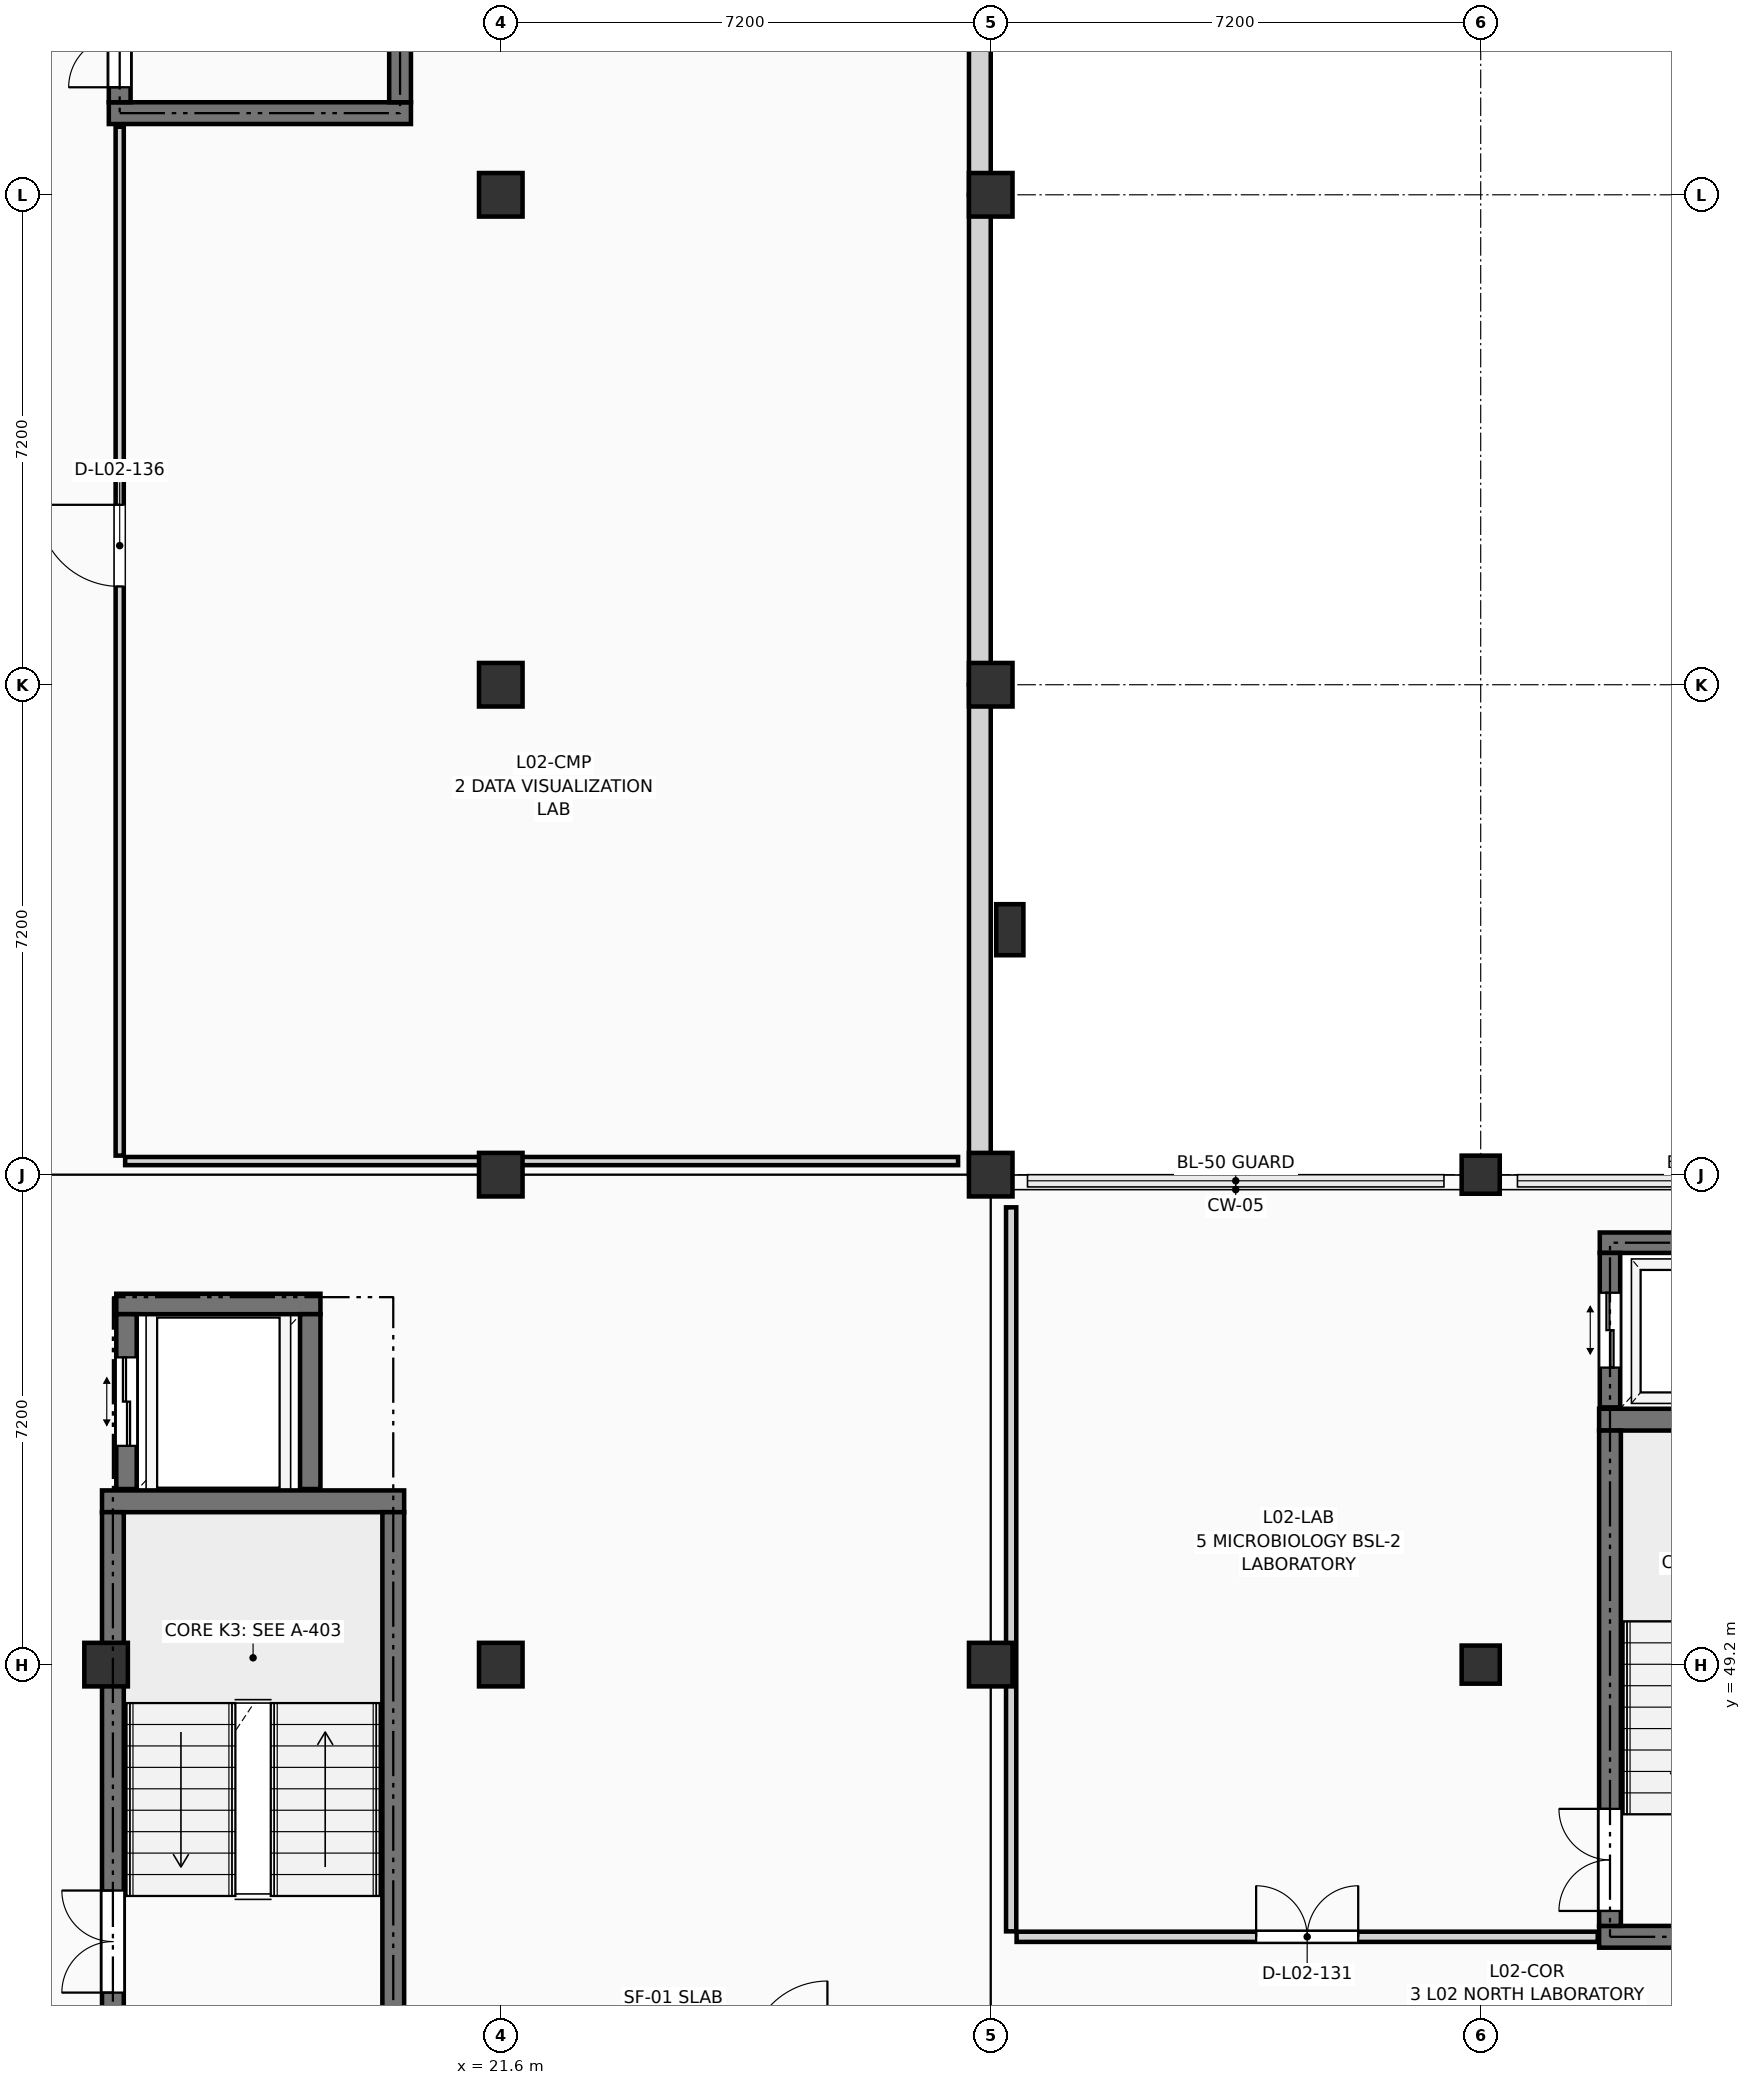
"""IFC4 building model, lengths in metres.
Left out: names, types, materials, properties, quantities, classifications, styles, units other than length and angle.
Written with IfcOpenShell. Run it as: python <this file> out.ifc"""

import sys

from ifc_helpers import new_model, si_unit, direction, frame, frame_2d, origin, origin_2d, place, context, subcontext, project, spatial, rectangle, extrude, element, fill, save


model = new_model("IFC4")
c1 = context("Model", 3, precision=1e-05, world=origin(), true_north=direction((0.0, 1.0)))
c2 = subcontext(c1, "Body", "Model", "MODEL_VIEW")
j1 = project(units=[si_unit("LENGTHUNIT", "METRE"), si_unit("PLANEANGLEUNIT", "RADIAN")], contexts=[c1])
p1 = place(None, origin())
s1 = spatial("IfcSite", under=j1, at=p1, CompositionType="ELEMENT")
p2 = place(p1, origin())
s2 = spatial("IfcBuilding", under=s1, at=p2, CompositionType="ELEMENT")
p3 = place(p2, frame((0.0, 0.0, 8.55)))
s3 = spatial("IfcBuildingStorey", under=s2, at=p3, CompositionType="ELEMENT", Elevation=8.55)
for number, where, z_axis, x_axis in (
    (1, (15.8, 49.2, 0.0), (0.0, 0.0, 1.0), (1.0, 0.0, 0.0)),
    (2, (21.6, 49.2, 0.0), (0.0, 0.0, 1.0), (1.0, 0.0, 0.0)),
    (3, (21.6, 56.4, 0.0), (0.0, 0.0, 1.0), (1.0, 0.0, 0.0)),
    (4, (21.6, 63.6, 0.0), (0.0, 0.0, 1.0), (1.0, 0.0, 0.0)),
    (5, (21.6, 70.8, 0.0), (0.0, 0.0, 1.0), (1.0, 0.0, 0.0)),
    (6, (28.8, 49.2, 0.0), (0.0, 0.0, 1.0), (1.0, 0.0, 0.0)),
    (7, (28.8, 56.4, 0.0), (0.0, 0.0, 1.0), (1.0, 0.0, 0.0)),
    (8, (28.8, 63.6, 0.0), (0.0, 0.0, 1.0), (1.0, 0.0, 0.0)),
    (9, (28.8, 70.8, 0.0), (0.0, 0.0, 1.0), (1.0, 0.0, 0.0)),
):
    element("IfcColumn", number, at=place(p3, frame(where, z_axis=z_axis, x_axis=x_axis)), inside=s3, PredefinedType="COLUMN", context=c2, shape_type="SweptSolid", body=[
        extrude(rectangle(XDim=0.64, YDim=0.64, at=origin_2d()), origin(), (0.0, 0.0, 1.0), 3.6),
    ])
for number, where, z_axis, x_axis in (
    (10, (36.0, 49.2, 0.0), (0.0, 0.0, 1.0), (1.0, 0.0, 0.0)),
    (11, (36.0, 56.4, 0.0), (0.0, 0.0, 1.0), (1.0, 0.0, 0.0)),
):
    element("IfcColumn", number, at=place(p3, frame(where, z_axis=z_axis, x_axis=x_axis)), inside=s3, PredefinedType="COLUMN", context=c2, shape_type="SweptSolid", body=[
        extrude(rectangle(XDim=0.56, YDim=0.56, at=origin_2d()), origin(), (0.0, 0.0, 1.0), 3.6),
    ])
p4 = place(p3, frame((29.08, 60.0, 0.0), z_axis=(0.0, 0.0, 1.0), x_axis=(1.0, 0.0, 0.0)))
e12 = element("IfcColumn", 12, at=p4, inside=s3, PredefinedType="PILASTER", context=c2, shape_type="SweptSolid", body=[
    extrude(rectangle(XDim=0.4, YDim=0.75, at=origin_2d()), origin(), (0.0, 0.0, 1.0), 3.6),
])
for number, where, z_axis, x_axis in (
    (13, (28.64, 70.8, 0.0), (0.0, 0.0, 1.0), (0.0, 1.0, 0.0)),
    (14, (28.64, 63.6, 0.0), (0.0, 0.0, 1.0), (0.0, 1.0, 0.0)),
):
    element("IfcWall", number, at=place(p3, frame(where, z_axis=z_axis, x_axis=x_axis)), inside=s3, PredefinedType="SOLIDWALL", context=c2, shape_type="SweptSolid", body=[
        extrude(rectangle(XDim=7.2, YDim=0.32, at=frame_2d((3.6, 0.0))), origin(), (0.0, 0.0, 1.0), 2.84),
    ])
p5 = place(p3, frame((28.64, 56.4, 0.0), z_axis=(0.0, 0.0, 1.0), x_axis=(0.0, 1.0, 0.0)))
e15 = element("IfcWall", 15, at=p5, inside=s3, PredefinedType="SOLIDWALL", context=c2, shape_type="SweptSolid", body=[
    extrude(rectangle(XDim=7.2, YDim=0.32, at=frame_2d((3.6, 0.0))), origin(), (0.0, 0.0, 1.0), 2.84),
])
p6 = place(p3, frame((15.74, 51.6, 0.0), z_axis=(0.0, 0.0, 1.0), x_axis=(1.0, 0.0, 0.0)))
e16 = element("IfcWall", 16, at=p6, inside=s3, PredefinedType="SHEAR", context=c2, shape_type="SweptSolid", body=[
    extrude(rectangle(XDim=4.44, YDim=0.32, at=frame_2d((2.22, 0.0))), origin(), (0.0, 0.0, 1.0), 3.39),
])
p7 = place(p3, frame((15.9, 44.16, 0.0), z_axis=(0.0, 0.0, 1.0), x_axis=(0.0, 1.0, 0.0)))
e17 = element("IfcWall", 17, at=p7, inside=s3, PredefinedType="SHEAR", context=c2, shape_type="SweptSolid", body=[
    extrude(rectangle(XDim=7.28, YDim=0.32, at=frame_2d((3.64, 0.0))), origin(), (0.0, 0.0, 1.0), 3.39),
])
p8 = place(p7, frame((0.22, 0.0, 0.0)))
e18 = element("IfcOpeningElement", 18, at=p8, cuts=e17, PredefinedType="OPENING", context=c2, shape_type="SweptSolid", body=[
    extrude(rectangle(XDim=1.5, YDim=2.2, at=frame_2d((0.75, 1.1))), frame((0.0, 0.172, 0.0), z_axis=(0.0, -1.0, 0.0), x_axis=(1.0, 0.0, 0.0)), (0.0, 0.0, 1.0), 0.344),
])
p9 = place(p3, frame((20.02, 44.16, 0.0), z_axis=(0.0, 0.0, 1.0), x_axis=(0.0, 1.0, 0.0)))
e19 = element("IfcWall", 19, at=p9, inside=s3, PredefinedType="SHEAR", context=c2, shape_type="SweptSolid", body=[
    extrude(rectangle(XDim=7.28, YDim=0.32, at=frame_2d((3.64, 0.0))), origin(), (0.0, 0.0, 1.0), 3.39),
])
for number, where, z_axis, x_axis in (
    (20, (37.74, 45.2, 0.0), (0.0, 0.0, 1.0), (1.0, 0.0, 0.0)),
    (21, (37.74, 52.8, 0.0), (0.0, 0.0, 1.0), (1.0, 0.0, 0.0)),
):
    element("IfcWall", number, at=place(p3, frame(where, z_axis=z_axis, x_axis=x_axis)), inside=s3, PredefinedType="SHEAR", context=c2, shape_type="SweptSolid", body=[
        extrude(rectangle(XDim=4.44, YDim=0.32, at=frame_2d((2.22, 0.0))), origin(), (0.0, 0.0, 1.0), 3.39),
    ])
p10 = place(p3, frame((37.9, 45.36, 0.0), z_axis=(0.0, 0.0, 1.0), x_axis=(0.0, 1.0, 0.0)))
e22 = element("IfcWall", 22, at=p10, inside=s3, PredefinedType="SHEAR", context=c2, shape_type="SweptSolid", body=[
    extrude(rectangle(XDim=7.28, YDim=0.32, at=frame_2d((3.64, 0.0))), origin(), (0.0, 0.0, 1.0), 3.39),
])
p11 = place(p10, frame((0.22, 0.0, 0.0)))
e23 = element("IfcOpeningElement", 23, at=p11, cuts=e22, PredefinedType="OPENING", context=c2, shape_type="SweptSolid", body=[
    extrude(rectangle(XDim=1.5, YDim=2.2, at=frame_2d((0.75, 1.1))), frame((0.0, 0.172, 0.0), z_axis=(0.0, -1.0, 0.0), x_axis=(1.0, 0.0, 0.0)), (0.0, 0.0, 1.0), 0.344),
])
p12 = place(p3, frame((15.84, 72.0, 0.0), z_axis=(0.0, 0.0, 1.0), x_axis=(1.0, 0.0, 0.0)))
e24 = element("IfcWall", 24, at=p12, inside=s3, PredefinedType="SHEAR", context=c2, shape_type="SweptSolid", body=[
    extrude(rectangle(XDim=4.44, YDim=0.32, at=frame_2d((2.22, 0.0))), origin(), (0.0, 0.0, 1.0), 3.39),
])
p13 = place(p3, frame((16.0, 72.16, 0.0), z_axis=(0.0, 0.0, 1.0), x_axis=(0.0, 1.0, 0.0)))
e25 = element("IfcWall", 25, at=p13, inside=s3, PredefinedType="SHEAR", context=c2, shape_type="SweptSolid", body=[
    extrude(rectangle(XDim=7.28, YDim=0.32, at=frame_2d((3.64, 0.0))), origin(), (0.0, 0.0, 1.0), 3.39),
])
p14 = place(p13, frame((0.22, 0.0, 0.0)))
e26 = element("IfcOpeningElement", 26, at=p14, cuts=e25, PredefinedType="OPENING", context=c2, shape_type="SweptSolid", body=[
    extrude(rectangle(XDim=1.5, YDim=2.2, at=frame_2d((0.75, 1.1))), frame((0.0, 0.172, 0.0), z_axis=(0.0, -1.0, 0.0), x_axis=(1.0, 0.0, 0.0)), (0.0, 0.0, 1.0), 0.344),
])
p15 = place(p3, frame((20.12, 72.16, 0.0), z_axis=(0.0, 0.0, 1.0), x_axis=(0.0, 1.0, 0.0)))
e27 = element("IfcWall", 27, at=p15, inside=s3, PredefinedType="SHEAR", context=c2, shape_type="SweptSolid", body=[
    extrude(rectangle(XDim=7.28, YDim=0.32, at=frame_2d((3.64, 0.0))), origin(), (0.0, 0.0, 1.0), 3.39),
])
p16 = place(p3, frame((37.75, 55.4, 0.0), z_axis=(0.0, 0.0, 1.0), x_axis=(1.0, 0.0, 0.0)))
e28 = element("IfcWall", 28, at=p16, inside=s3, PredefinedType="SHEAR", context=c2, shape_type="SweptSolid", body=[
    extrude(rectangle(XDim=2.7, YDim=0.3, at=frame_2d((1.35, 0.0))), origin(), (0.0, 0.0, 1.0), 3.39),
])
p17 = place(p3, frame((37.9, 52.98, 0.0), z_axis=(0.0, 0.0, 1.0), x_axis=(0.0, 1.0, 0.0)))
e29 = element("IfcWall", 29, at=p17, inside=s3, PredefinedType="SHEAR", context=c2, shape_type="SweptSolid", body=[
    extrude(rectangle(XDim=2.27, YDim=0.3, at=frame_2d((1.135, 0.0))), origin(), (0.0, 0.0, 1.0), 3.39),
])
p18 = place(p17, frame((0.585, 0.0, 0.0)))
e30 = element("IfcOpeningElement", 30, at=p18, cuts=e29, PredefinedType="OPENING", context=c2, shape_type="SweptSolid", body=[
    extrude(rectangle(XDim=1.1, YDim=2.2, at=frame_2d((0.55, 1.1))), frame((0.0, 0.162, 0.0), z_axis=(0.0, -1.0, 0.0), x_axis=(1.0, 0.0, 0.0)), (0.0, 0.0, 1.0), 0.324),
])
p19 = place(p3, frame((15.95, 54.5, 0.0), z_axis=(0.0, 0.0, 1.0), x_axis=(1.0, 0.0, 0.0)))
e31 = element("IfcWall", 31, at=p19, inside=s3, PredefinedType="SHEAR", context=c2, shape_type="SweptSolid", body=[
    extrude(rectangle(XDim=3.0, YDim=0.3, at=frame_2d((1.5, 0.0))), origin(), (0.0, 0.0, 1.0), 3.39),
])
p20 = place(p3, frame((16.1, 51.78, 0.0), z_axis=(0.0, 0.0, 1.0), x_axis=(0.0, 1.0, 0.0)))
e32 = element("IfcWall", 32, at=p20, inside=s3, PredefinedType="SHEAR", context=c2, shape_type="SweptSolid", body=[
    extrude(rectangle(XDim=2.57, YDim=0.3, at=frame_2d((1.285, 0.0))), origin(), (0.0, 0.0, 1.0), 3.39),
])
p21 = place(p20, frame((0.635, 0.0, 0.0)))
e33 = element("IfcOpeningElement", 33, at=p21, cuts=e32, PredefinedType="OPENING", context=c2, shape_type="SweptSolid", body=[
    extrude(rectangle(XDim=1.3, YDim=2.25, at=frame_2d((0.65, 1.125))), frame((0.0, 0.162, 0.0), z_axis=(0.0, -1.0, 0.0), x_axis=(1.0, 0.0, 0.0)), (0.0, 0.0, 1.0), 0.324),
])
p22 = place(p3, frame((18.8, 51.78, 0.0), z_axis=(0.0, 0.0, 1.0), x_axis=(0.0, 1.0, 0.0)))
e34 = element("IfcWall", 34, at=p22, inside=s3, PredefinedType="SHEAR", context=c2, shape_type="SweptSolid", body=[
    extrude(rectangle(XDim=2.57, YDim=0.3, at=frame_2d((1.285, 0.0))), origin(), (0.0, 0.0, 1.0), 3.39),
])
p23 = place(p3, frame((29.1, 45.28, 0.0), z_axis=(0.0, 0.0, 1.0), x_axis=(0.0, 1.0, 0.0)))
e35 = element("IfcWall", 35, at=p23, inside=s3, PredefinedType="PARTITIONING", context=c2, shape_type="SweptSolid", body=[
    extrude(rectangle(XDim=10.64, YDim=0.15, at=frame_2d((5.32, 0.0))), origin(), (0.0, 0.0, 1.0), 2.655),
])
p24 = place(p3, frame((29.18, 45.2, 0.0), z_axis=(0.0, 0.0, 1.0), x_axis=(1.0, 0.0, 0.0)))
e36 = element("IfcWall", 36, at=p24, inside=s3, PredefinedType="PARTITIONING", context=c2, shape_type="SweptSolid", body=[
    extrude(rectangle(XDim=8.54, YDim=0.15, at=frame_2d((4.27, 0.0))), origin(), (0.0, 0.0, 1.0), 3.375),
])
p25 = place(p24, frame((3.52, 0.0, 0.0)))
e37 = element("IfcOpeningElement", 37, at=p25, cuts=e36, PredefinedType="OPENING", context=c2, shape_type="SweptSolid", body=[
    extrude(rectangle(XDim=1.5, YDim=2.2, at=frame_2d((0.75, 1.1))), frame((0.0, 0.087, 0.0), z_axis=(0.0, -1.0, 0.0), x_axis=(1.0, 0.0, 0.0)), (0.0, 0.0, 1.0), 0.174),
])
p26 = place(p3, frame((16.0, 56.68, 0.0), z_axis=(0.0, 0.0, 1.0), x_axis=(0.0, 1.0, 0.0)))
e38 = element("IfcWall", 38, at=p26, inside=s3, PredefinedType="PARTITIONING", context=c2, shape_type="SweptSolid", body=[
    extrude(rectangle(XDim=15.12, YDim=0.12, at=frame_2d((7.56, 0.0))), origin(), (0.0, 0.0, 1.0), 3.375),
])
p27 = place(p26, frame((8.364, 0.0, 0.0)))
e39 = element("IfcOpeningElement", 39, at=p27, cuts=e38, PredefinedType="OPENING", context=c2, shape_type="SweptSolid", body=[
    extrude(rectangle(XDim=1.2, YDim=2.15, at=frame_2d((0.6, 1.075))), frame((0.0, 0.072, 0.0), z_axis=(0.0, -1.0, 0.0), x_axis=(1.0, 0.0, 0.0)), (0.0, 0.0, 1.0), 0.144),
])
p28 = place(p3, frame((16.08, 56.6, 0.0), z_axis=(0.0, 0.0, 1.0), x_axis=(1.0, 0.0, 0.0)))
e40 = element("IfcWall", 40, at=p28, inside=s3, PredefinedType="PARTITIONING", context=c2, shape_type="SweptSolid", body=[
    extrude(rectangle(XDim=12.24, YDim=0.12, at=frame_2d((6.12, 0.0))), origin(), (0.0, 0.0, 1.0), 2.595),
])
p29 = place(p8, origin())
e41 = element("IfcDoor", 41, at=p29, inside=s3, OperationType="DOUBLE_DOOR_SINGLE_SWING", PredefinedType="DOOR", context=c2, shape_type="SweptSolid", body=[
    extrude(rectangle(XDim=1.5, YDim=2.2, at=frame_2d((0.75, 1.1))), frame((0.0, 0.025, 0.0), z_axis=(0.0, -1.0, 0.0), x_axis=(1.0, 0.0, 0.0)), (0.0, 0.0, 1.0), 0.05),
])
fill(e18, e41)
p30 = place(p11, origin())
e42 = element("IfcDoor", 42, at=p30, inside=s3, OperationType="DOUBLE_DOOR_SINGLE_SWING", PredefinedType="DOOR", context=c2, shape_type="SweptSolid", body=[
    extrude(rectangle(XDim=1.5, YDim=2.2, at=frame_2d((0.75, 1.1))), frame((0.0, 0.025, 0.0), z_axis=(0.0, -1.0, 0.0), x_axis=(1.0, 0.0, 0.0)), (0.0, 0.0, 1.0), 0.05),
])
fill(e23, e42)
p31 = place(p14, origin())
e43 = element("IfcDoor", 43, at=p31, inside=s3, OperationType="DOUBLE_DOOR_SINGLE_SWING", PredefinedType="DOOR", context=c2, shape_type="SweptSolid", body=[
    extrude(rectangle(XDim=1.5, YDim=2.2, at=frame_2d((0.75, 1.1))), frame((0.0, 0.025, 0.0), z_axis=(0.0, -1.0, 0.0), x_axis=(1.0, 0.0, 0.0)), (0.0, 0.0, 1.0), 0.05),
])
fill(e26, e43)
p32 = place(p18, origin())
e44 = element("IfcDoor", 44, at=p32, inside=s3, OperationType="DOUBLE_DOOR_SLIDING", PredefinedType="DOOR", context=c2, shape_type="SweptSolid", body=[
    extrude(rectangle(XDim=1.1, YDim=2.2, at=frame_2d((0.55, 1.1))), frame((0.0, 0.025, 0.0), z_axis=(0.0, -1.0, 0.0), x_axis=(1.0, 0.0, 0.0)), (0.0, 0.0, 1.0), 0.05),
])
fill(e30, e44)
p33 = place(p21, origin())
e45 = element("IfcDoor", 45, at=p33, inside=s3, OperationType="DOUBLE_DOOR_SLIDING", PredefinedType="DOOR", context=c2, shape_type="SweptSolid", body=[
    extrude(rectangle(XDim=1.3, YDim=2.25, at=frame_2d((0.65, 1.125))), frame((0.0, 0.025, 0.0), z_axis=(0.0, -1.0, 0.0), x_axis=(1.0, 0.0, 0.0)), (0.0, 0.0, 1.0), 0.05),
])
fill(e33, e45)
p34 = place(p25, origin())
e46 = element("IfcDoor", 46, at=p34, inside=s3, OperationType="DOUBLE_DOOR_SINGLE_SWING", PredefinedType="DOOR", context=c2, shape_type="SweptSolid", body=[
    extrude(rectangle(XDim=1.5, YDim=2.2, at=frame_2d((0.75, 1.1))), frame((0.0, 0.025, 0.0), z_axis=(0.0, -1.0, 0.0), x_axis=(1.0, 0.0, 0.0)), (0.0, 0.0, 1.0), 0.05),
])
fill(e37, e46)
p35 = place(p27, origin())
e47 = element("IfcDoor", 47, at=p35, inside=s3, OperationType="SINGLE_SWING_RIGHT", PredefinedType="DOOR", context=c2, shape_type="SweptSolid", body=[
    extrude(rectangle(XDim=1.2, YDim=2.15, at=frame_2d((0.6, 1.075))), frame((0.0, 0.025, 0.0), z_axis=(0.0, -1.0, 0.0), x_axis=(1.0, 0.0, 0.0)), (0.0, 0.0, 1.0), 0.05),
])
fill(e39, e47)
save(model, sys.argv[1])
